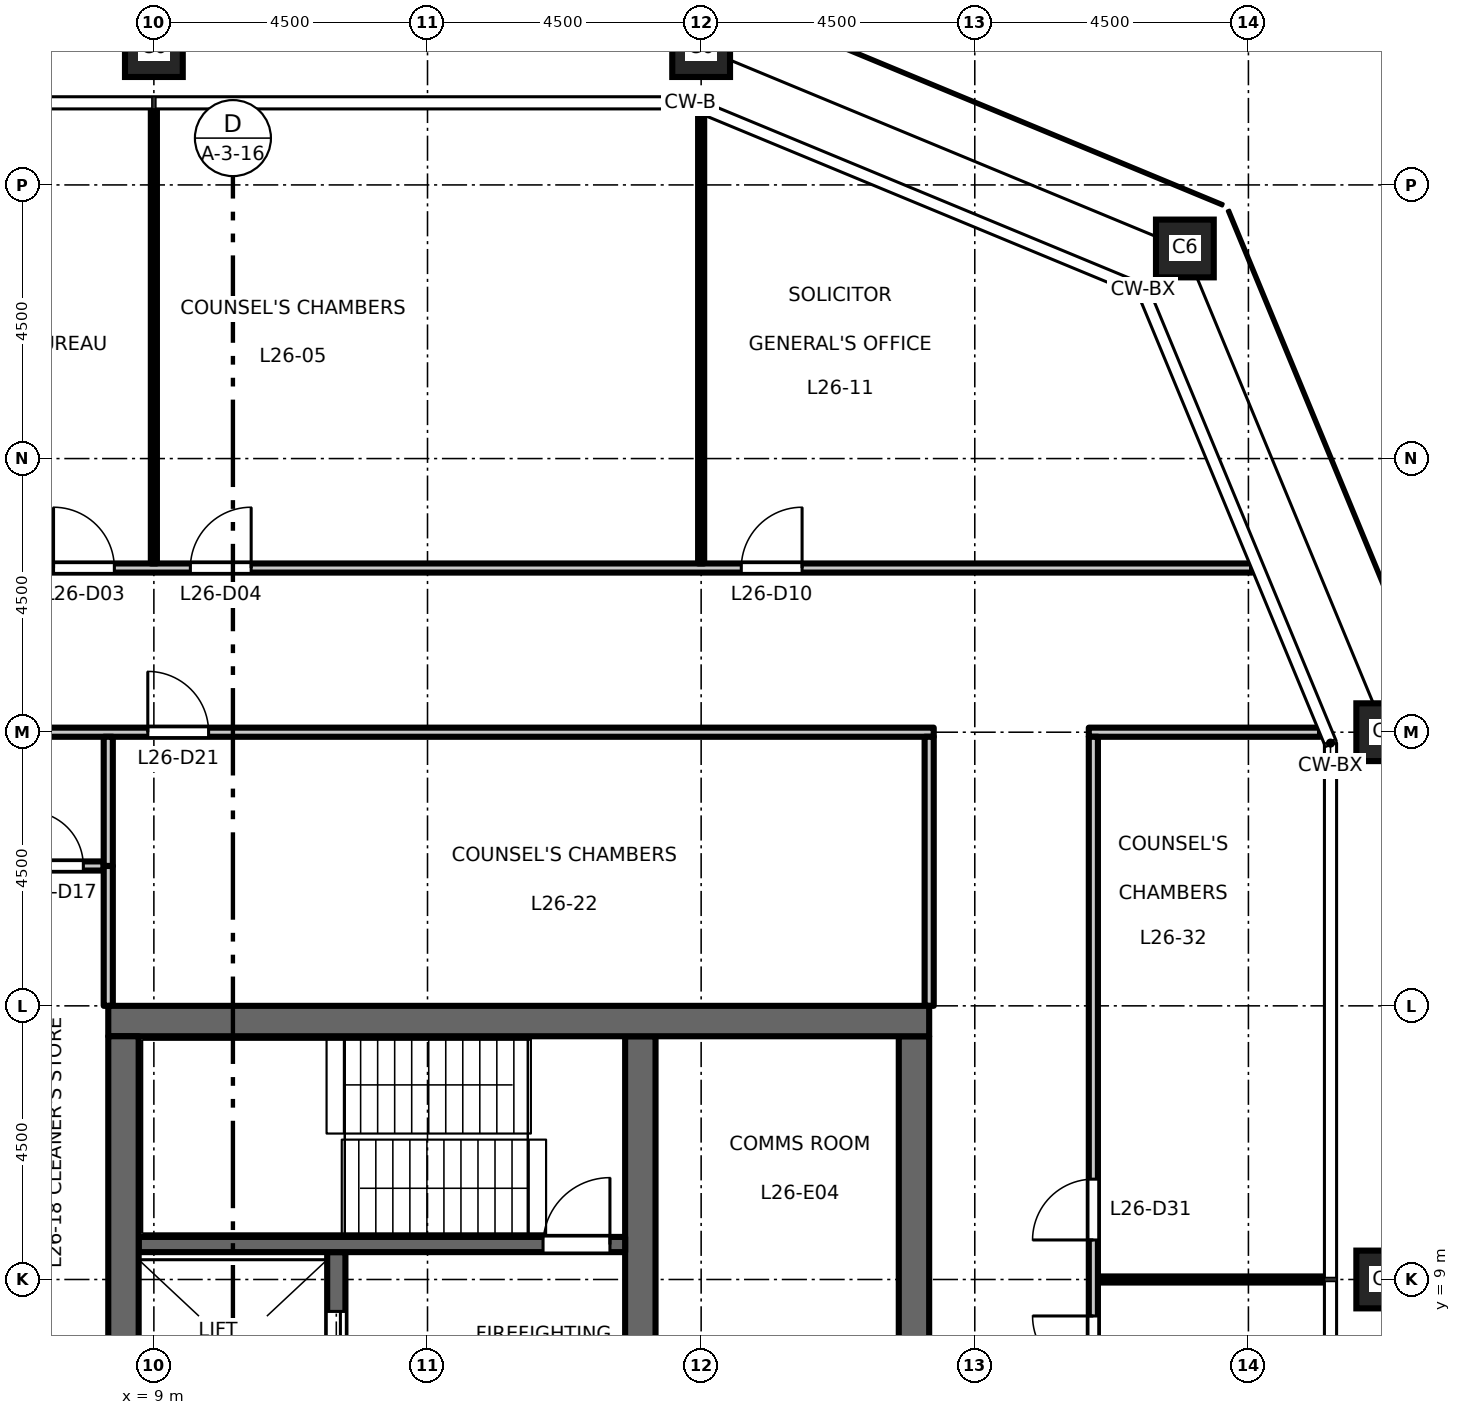
"""IFC4 building model, lengths in metres.
Left out: names, types, materials, properties, quantities, classifications, styles, units other than length and angle.
Written with IfcOpenShell. Run it as: python <this file> out.ifc"""

import sys

from ifc_helpers import new_model, si_unit, direction, frame, frame_2d, origin, origin_2d, place, context, subcontext, project, spatial, rectangle, hollow_rectangle, extrude, element, fill, save


model = new_model("IFC4")
c1 = context("Model", 3, precision=1e-05, world=origin(), true_north=direction((0.0, 1.0)))
c2 = subcontext(c1, "Body", "Model", "MODEL_VIEW")
j1 = project(units=[si_unit("LENGTHUNIT", "METRE"), si_unit("PLANEANGLEUNIT", "RADIAN")], contexts=[c1])
p1 = place(None, origin())
s1 = spatial("IfcSite", under=j1, at=p1, CompositionType="ELEMENT")
p2 = place(p1, origin())
s2 = spatial("IfcBuilding", under=s1, at=p2, CompositionType="ELEMENT")
p3 = place(p2, frame((0.0, 0.0, 122.7)))
s3 = spatial("IfcBuildingStorey", under=s2, at=p3, CompositionType="ELEMENT", Elevation=122.7)
for number, where, z_axis, x_axis in (
    (1, (29.25, 9.0, 0.0), (0.0, 0.0, 1.0), (1.0, 0.0, 0.0)),
    (2, (29.25, 18.0, 0.0), (0.0, 0.0, 1.0), (1.0, 0.0, 0.0)),
    (3, (25.955, 25.955, 0.0), (0.0, 0.0, 1.0), (1.0, 0.0, 0.0)),
    (4, (18.0, 29.25, 0.0), (0.0, 0.0, 1.0), (1.0, 0.0, 0.0)),
    (5, (9.0, 29.25, 0.0), (0.0, 0.0, 1.0), (1.0, 0.0, 0.0)),
):
    element("IfcColumn", number, at=place(p3, frame(where, z_axis=z_axis, x_axis=x_axis)), inside=s3, PredefinedType="COLUMN", context=c2, shape_type="SweptSolid", body=[
        extrude(hollow_rectangle(XDim=0.95, YDim=0.95, WallThickness=0.055, at=origin_2d()), origin(), (0.0, 0.0, 1.0), 4.5),
    ])
p4 = place(p3, frame((12.0, -9.45, 0.0), z_axis=(0.0, 0.0, 1.0), x_axis=(0.0, 1.0, 0.0)))
e6 = element("IfcWall", 6, at=p4, inside=s3, PredefinedType="SHEAR", context=c2, shape_type="SweptSolid", body=[
    extrude(rectangle(XDim=18.9, YDim=0.3, at=frame_2d((9.45, 0.0))), origin(), (0.0, 0.0, 1.0), 4.35),
])
p5 = place(p4, frame((3.625, 0.0, 0.0)))
e7 = element("IfcOpeningElement", 7, at=p5, cuts=e6, PredefinedType="OPENING", context=c2, shape_type="SweptSolid", body=[
    extrude(rectangle(XDim=1.1, YDim=2.1, at=frame_2d((0.55, 1.05))), frame((0.0, 0.16, 0.0), z_axis=(0.0, -1.0, 0.0), x_axis=(1.0, 0.0, 0.0)), (0.0, 0.0, 1.0), 0.32),
])
p6 = place(p4, frame((6.775, 0.0, 0.0)))
e8 = element("IfcOpeningElement", 8, at=p6, cuts=e6, PredefinedType="OPENING", context=c2, shape_type="SweptSolid", body=[
    extrude(rectangle(XDim=1.1, YDim=2.1, at=frame_2d((0.55, 1.05))), frame((0.0, 0.16, 0.0), z_axis=(0.0, -1.0, 0.0), x_axis=(1.0, 0.0, 0.0)), (0.0, 0.0, 1.0), 0.32),
])
p7 = place(p4, frame((9.925, 0.0, 0.0)))
e9 = element("IfcOpeningElement", 9, at=p7, cuts=e6, PredefinedType="OPENING", context=c2, shape_type="SweptSolid", body=[
    extrude(rectangle(XDim=1.1, YDim=2.1, at=frame_2d((0.55, 1.05))), frame((0.0, 0.16, 0.0), z_axis=(0.0, -1.0, 0.0), x_axis=(1.0, 0.0, 0.0)), (0.0, 0.0, 1.0), 0.32),
])
p8 = place(p4, frame((13.075, 0.0, 0.0)))
e10 = element("IfcOpeningElement", 10, at=p8, cuts=e6, PredefinedType="OPENING", context=c2, shape_type="SweptSolid", body=[
    extrude(rectangle(XDim=1.1, YDim=2.1, at=frame_2d((0.55, 1.05))), frame((0.0, 0.16, 0.0), z_axis=(0.0, -1.0, 0.0), x_axis=(1.0, 0.0, 0.0)), (0.0, 0.0, 1.0), 0.32),
])
p9 = place(p4, frame((16.725, 0.0, 0.0)))
e11 = element("IfcOpeningElement", 11, at=p9, cuts=e6, PredefinedType="OPENING", context=c2, shape_type="SweptSolid", body=[
    extrude(rectangle(XDim=1.2, YDim=2.1, at=frame_2d((0.6, 1.05))), frame((0.0, 0.16, 0.0), z_axis=(0.0, -1.0, 0.0), x_axis=(1.0, 0.0, 0.0)), (0.0, 0.0, 1.0), 0.32),
])
p10 = place(p4, frame((0.975, 0.0, 0.0)))
e12 = element("IfcOpeningElement", 12, at=p10, cuts=e6, PredefinedType="OPENING", context=c2, shape_type="SweptSolid", body=[
    extrude(rectangle(XDim=1.2, YDim=2.1, at=frame_2d((0.6, 1.05))), frame((0.0, 0.16, 0.0), z_axis=(0.0, -1.0, 0.0), x_axis=(1.0, 0.0, 0.0)), (0.0, 0.0, 1.0), 0.32),
])
p11 = place(p3, frame((21.5, -13.0, 0.0), z_axis=(0.0, 0.0, 1.0), x_axis=(0.0, 1.0, 0.0)))
e13 = element("IfcWall", 13, at=p11, inside=s3, PredefinedType="SHEAR", context=c2, shape_type="SweptSolid", body=[
    extrude(rectangle(XDim=26.0, YDim=0.5, at=frame_2d((13.0, 0.0))), origin(), (0.0, 0.0, 1.0), 4.35),
])
p12 = place(p11, frame((16.825, 0.0, 0.0)))
e14 = element("IfcOpeningElement", 14, at=p12, cuts=e13, PredefinedType="OPENING", context=c2, shape_type="SweptSolid", body=[
    extrude(rectangle(XDim=1.8, YDim=2.1, at=frame_2d((0.9, 1.05))), frame((0.0, 0.26, 0.0), z_axis=(0.0, -1.0, 0.0), x_axis=(1.0, 0.0, 0.0)), (0.0, 0.0, 1.0), 0.52),
])
p13 = place(p11, frame((7.375, 0.0, 0.0)))
e15 = element("IfcOpeningElement", 15, at=p13, cuts=e13, PredefinedType="OPENING", context=c2, shape_type="SweptSolid", body=[
    extrude(rectangle(XDim=1.8, YDim=2.1, at=frame_2d((0.9, 1.05))), frame((0.0, 0.26, 0.0), z_axis=(0.0, -1.0, 0.0), x_axis=(1.0, 0.0, 0.0)), (0.0, 0.0, 1.0), 0.52),
])
p14 = place(p11, frame((1.3, 0.0, 0.0)))
e16 = element("IfcOpeningElement", 16, at=p14, cuts=e13, PredefinedType="OPENING", context=c2, shape_type="SweptSolid", body=[
    extrude(rectangle(XDim=0.9, YDim=2.1, at=frame_2d((0.45, 1.05))), frame((0.0, 0.26, 0.0), z_axis=(0.0, -1.0, 0.0), x_axis=(1.0, 0.0, 0.0)), (0.0, 0.0, 1.0), 0.52),
])
p15 = place(p3, frame((17.0, 6.425, 0.0), z_axis=(0.0, 0.0, 1.0), x_axis=(0.0, 1.0, 0.0)))
e17 = element("IfcWall", 17, at=p15, inside=s3, PredefinedType="SHEAR", context=c2, shape_type="SweptSolid", body=[
    extrude(rectangle(XDim=6.575, YDim=0.5, at=frame_2d((3.288, 0.0))), origin(), (0.0, 0.0, 1.0), 4.35),
])
p16 = place(p3, frame((8.75, 9.575, 0.0), z_axis=(0.0, 0.0, 1.0), x_axis=(1.0, 0.0, 0.0)))
e18 = element("IfcWall", 18, at=p16, inside=s3, PredefinedType="SHEAR", context=c2, shape_type="SweptSolid", body=[
    extrude(rectangle(XDim=8.0, YDim=0.25, at=frame_2d((4.0, 0.0))), origin(), (0.0, 0.0, 1.0), 4.35),
])
p17 = place(p16, frame((6.65, 0.0, 0.0)))
e19 = element("IfcOpeningElement", 19, at=p17, cuts=e18, PredefinedType="OPENING", context=c2, shape_type="SweptSolid", body=[
    extrude(rectangle(XDim=1.1, YDim=2.1, at=frame_2d((0.55, 1.05))), frame((0.0, 0.135, 0.0), z_axis=(0.0, -1.0, 0.0), x_axis=(1.0, 0.0, 0.0)), (0.0, 0.0, 1.0), 0.27),
])
p18 = place(p3, frame((8.25, 13.25, 0.0), z_axis=(0.0, 0.0, 1.0), x_axis=(1.0, 0.0, 0.0)))
e20 = element("IfcWall", 20, at=p18, inside=s3, PredefinedType="SHEAR", context=c2, shape_type="SweptSolid", body=[
    extrude(rectangle(XDim=13.5, YDim=0.5, at=frame_2d((6.75, 0.0))), origin(), (0.0, 0.0, 1.0), 4.35),
])
p19 = place(p3, frame((8.5, -13.0, 0.0), z_axis=(0.0, 0.0, 1.0), x_axis=(0.0, 1.0, 0.0)))
e21 = element("IfcWall", 21, at=p19, inside=s3, PredefinedType="SHEAR", context=c2, shape_type="SweptSolid", body=[
    extrude(rectangle(XDim=26.0, YDim=0.5, at=frame_2d((13.0, 0.0))), origin(), (0.0, 0.0, 1.0), 4.35),
])
p20 = place(p3, frame((24.525, 9.0, 0.0), z_axis=(0.0, 0.0, 1.0), x_axis=(1.0, 0.0, 0.0)))
e22 = element("IfcWall", 22, at=p20, inside=s3, PredefinedType="PARTITIONING", context=c2, shape_type="SweptSolid", body=[
    extrude(rectangle(XDim=3.735, YDim=0.1, at=frame_2d((1.868, 0.0))), origin(), (0.0, 0.0, 1.0), 4.35),
])
p21 = place(p3, frame((6.54, 15.8, 0.0), z_axis=(0.0, 0.0, 1.0), x_axis=(1.0, 0.0, 0.0)))
e23 = element("IfcWall", 23, at=p21, inside=s3, PredefinedType="PARTITIONING", context=c2, shape_type="SweptSolid", body=[
    extrude(rectangle(XDim=1.635, YDim=0.15, at=frame_2d((0.817, 0.0))), origin(), (0.0, 0.0, 1.0), 4.35),
])
p22 = place(p21, frame((0.4, 0.0, 0.0)))
e24 = element("IfcOpeningElement", 24, at=p22, cuts=e23, PredefinedType="OPENING", context=c2, shape_type="SweptSolid", body=[
    extrude(rectangle(XDim=0.9, YDim=2.1, at=frame_2d((0.45, 1.05))), frame((0.0, 0.085, 0.0), z_axis=(0.0, -1.0, 0.0), x_axis=(1.0, 0.0, 0.0)), (0.0, 0.0, 1.0), 0.17),
])
p23 = place(p3, frame((-21.825, 18.0, 0.0), z_axis=(0.0, 0.0, 1.0), x_axis=(1.0, 0.0, 0.0)))
e25 = element("IfcWall", 25, at=p23, inside=s3, PredefinedType="PARTITIONING", context=c2, shape_type="SweptSolid", body=[
    extrude(rectangle(XDim=43.65, YDim=0.15, at=frame_2d((21.825, 0.0))), origin(), (0.0, 0.0, 1.0), 4.35),
])
p24 = place(p23, frame((14.225, 0.0, 0.0)))
e26 = element("IfcOpeningElement", 26, at=p24, cuts=e25, PredefinedType="OPENING", context=c2, shape_type="SweptSolid", body=[
    extrude(rectangle(XDim=1.0, YDim=2.1, at=frame_2d((0.5, 1.05))), frame((0.0, 0.085, 0.0), z_axis=(0.0, -1.0, 0.0), x_axis=(1.0, 0.0, 0.0)), (0.0, 0.0, 1.0), 0.17),
])
p25 = place(p23, frame((11.975, 0.0, 0.0)))
e27 = element("IfcOpeningElement", 27, at=p25, cuts=e25, PredefinedType="OPENING", context=c2, shape_type="SweptSolid", body=[
    extrude(rectangle(XDim=1.0, YDim=2.1, at=frame_2d((0.5, 1.05))), frame((0.0, 0.085, 0.0), z_axis=(0.0, -1.0, 0.0), x_axis=(1.0, 0.0, 0.0)), (0.0, 0.0, 1.0), 0.17),
])
p26 = place(p23, frame((30.725, 0.0, 0.0)))
e28 = element("IfcOpeningElement", 28, at=p26, cuts=e25, PredefinedType="OPENING", context=c2, shape_type="SweptSolid", body=[
    extrude(rectangle(XDim=1.0, YDim=2.1, at=frame_2d((0.5, 1.05))), frame((0.0, 0.085, 0.0), z_axis=(0.0, -1.0, 0.0), x_axis=(1.0, 0.0, 0.0)), (0.0, 0.0, 1.0), 0.17),
])
p27 = place(p3, frame((24.375, 18.0, 0.0), z_axis=(0.0, 0.0, 1.0), x_axis=(1.0, 0.0, 0.0)))
e29 = element("IfcWall", 29, at=p27, inside=s3, PredefinedType="PARTITIONING", context=c2, shape_type="SweptSolid", body=[
    extrude(rectangle(XDim=3.803, YDim=0.15, at=frame_2d((1.901, 0.0))), origin(), (0.0, 0.0, 1.0), 4.35),
])
p28 = place(p3, frame((-27.06, 20.7, 0.0), z_axis=(0.0, 0.0, 1.0), x_axis=(1.0, 0.0, 0.0)))
e30 = element("IfcWall", 30, at=p28, inside=s3, PredefinedType="PARTITIONING", context=c2, shape_type="SweptSolid", body=[
    extrude(rectangle(XDim=54.12, YDim=0.15, at=frame_2d((27.06, 0.0))), origin(), (0.0, 0.0, 1.0), 4.35),
])
p29 = place(p28, frame((16.41, 0.0, 0.0)))
e31 = element("IfcOpeningElement", 31, at=p29, cuts=e30, PredefinedType="OPENING", context=c2, shape_type="SweptSolid", body=[
    extrude(rectangle(XDim=1.0, YDim=2.1, at=frame_2d((0.5, 1.05))), frame((0.0, 0.085, 0.0), z_axis=(0.0, -1.0, 0.0), x_axis=(1.0, 0.0, 0.0)), (0.0, 0.0, 1.0), 0.17),
])
p30 = place(p28, frame((18.66, 0.0, 0.0)))
e32 = element("IfcOpeningElement", 32, at=p30, cuts=e30, PredefinedType="OPENING", context=c2, shape_type="SweptSolid", body=[
    extrude(rectangle(XDim=1.0, YDim=2.1, at=frame_2d((0.5, 1.05))), frame((0.0, 0.085, 0.0), z_axis=(0.0, -1.0, 0.0), x_axis=(1.0, 0.0, 0.0)), (0.0, 0.0, 1.0), 0.17),
])
p31 = place(p28, frame((34.41, 0.0, 0.0)))
e33 = element("IfcOpeningElement", 33, at=p31, cuts=e30, PredefinedType="OPENING", context=c2, shape_type="SweptSolid", body=[
    extrude(rectangle(XDim=1.0, YDim=2.1, at=frame_2d((0.5, 1.05))), frame((0.0, 0.085, 0.0), z_axis=(0.0, -1.0, 0.0), x_axis=(1.0, 0.0, 0.0)), (0.0, 0.0, 1.0), 0.17),
])
p32 = place(p28, frame((36.66, 0.0, 0.0)))
e34 = element("IfcOpeningElement", 34, at=p32, cuts=e30, PredefinedType="OPENING", context=c2, shape_type="SweptSolid", body=[
    extrude(rectangle(XDim=1.0, YDim=2.1, at=frame_2d((0.5, 1.05))), frame((0.0, 0.085, 0.0), z_axis=(0.0, -1.0, 0.0), x_axis=(1.0, 0.0, 0.0)), (0.0, 0.0, 1.0), 0.17),
])
p33 = place(p28, frame((7.41, 0.0, 0.0)))
e35 = element("IfcOpeningElement", 35, at=p33, cuts=e30, PredefinedType="OPENING", context=c2, shape_type="SweptSolid", body=[
    extrude(rectangle(XDim=1.0, YDim=2.1, at=frame_2d((0.5, 1.05))), frame((0.0, 0.085, 0.0), z_axis=(0.0, -1.0, 0.0), x_axis=(1.0, 0.0, 0.0)), (0.0, 0.0, 1.0), 0.17),
])
p34 = place(p28, frame((45.72, 0.0, 0.0)))
e36 = element("IfcOpeningElement", 36, at=p34, cuts=e30, PredefinedType="OPENING", context=c2, shape_type="SweptSolid", body=[
    extrude(rectangle(XDim=1.0, YDim=2.1, at=frame_2d((0.5, 1.05))), frame((0.0, 0.085, 0.0), z_axis=(0.0, -1.0, 0.0), x_axis=(1.0, 0.0, 0.0)), (0.0, 0.0, 1.0), 0.17),
])
p35 = place(p3, frame((8.25, 15.8, 0.0), z_axis=(0.0, 0.0, 1.0), x_axis=(0.0, 1.0, 0.0)))
e37 = element("IfcWall", 37, at=p35, inside=s3, PredefinedType="PARTITIONING", context=c2, shape_type="SweptSolid", body=[
    extrude(rectangle(XDim=2.125, YDim=0.15, at=frame_2d((1.062, 0.0))), origin(), (0.0, 0.0, 1.0), 4.35),
])
p36 = place(p3, frame((8.25, 13.5, 0.0), z_axis=(0.0, 0.0, 1.0), x_axis=(0.0, 1.0, 0.0)))
e38 = element("IfcWall", 38, at=p36, inside=s3, PredefinedType="PARTITIONING", context=c2, shape_type="SweptSolid", body=[
    extrude(rectangle(XDim=2.3, YDim=0.15, at=frame_2d((1.15, 0.0))), origin(), (0.0, 0.0, 1.0), 4.35),
])
p37 = place(p3, frame((9.0, 20.775, 0.0), z_axis=(0.0, 0.0, 1.0), x_axis=(0.0, 1.0, 0.0)))
e39 = element("IfcWall", 39, at=p37, inside=s3, PredefinedType="PARTITIONING", context=c2, shape_type="SweptSolid", body=[
    extrude(rectangle(XDim=7.485, YDim=0.1, at=frame_2d((3.743, 0.0))), origin(), (0.0, 0.0, 1.0), 3.45),
])
p38 = place(p3, frame((18.0, 20.775, 0.0), z_axis=(0.0, 0.0, 1.0), x_axis=(0.0, 1.0, 0.0)))
e40 = element("IfcWall", 40, at=p38, inside=s3, PredefinedType="PARTITIONING", context=c2, shape_type="SweptSolid", body=[
    extrude(rectangle(XDim=7.403, YDim=0.1, at=frame_2d((3.702, 0.0))), origin(), (0.0, 0.0, 1.0), 3.45),
])
p39 = place(p3, frame((21.75, 13.5, 0.0), z_axis=(0.0, 0.0, 1.0), x_axis=(0.0, 1.0, 0.0)))
e41 = element("IfcWall", 41, at=p39, inside=s3, PredefinedType="PARTITIONING", context=c2, shape_type="SweptSolid", body=[
    extrude(rectangle(XDim=4.425, YDim=0.15, at=frame_2d((2.212, 0.0))), origin(), (0.0, 0.0, 1.0), 4.35),
])
p40 = place(p3, frame((24.45, -17.925, 0.0), z_axis=(0.0, 0.0, 1.0), x_axis=(0.0, 1.0, 0.0)))
e42 = element("IfcWall", 42, at=p40, inside=s3, PredefinedType="PARTITIONING", context=c2, shape_type="SweptSolid", body=[
    extrude(rectangle(XDim=35.85, YDim=0.15, at=frame_2d((17.925, 0.0))), origin(), (0.0, 0.0, 1.0), 4.35),
])
p41 = place(p40, frame((7.325, 0.0, 0.0)))
e43 = element("IfcOpeningElement", 43, at=p41, cuts=e42, PredefinedType="OPENING", context=c2, shape_type="SweptSolid", body=[
    extrude(rectangle(XDim=1.0, YDim=2.1, at=frame_2d((0.5, 1.05))), frame((0.0, 0.085, 0.0), z_axis=(0.0, -1.0, 0.0), x_axis=(1.0, 0.0, 0.0)), (0.0, 0.0, 1.0), 0.17),
])
p42 = place(p40, frame((9.575, 0.0, 0.0)))
e44 = element("IfcOpeningElement", 44, at=p42, cuts=e42, PredefinedType="OPENING", context=c2, shape_type="SweptSolid", body=[
    extrude(rectangle(XDim=1.0, YDim=2.1, at=frame_2d((0.5, 1.05))), frame((0.0, 0.085, 0.0), z_axis=(0.0, -1.0, 0.0), x_axis=(1.0, 0.0, 0.0)), (0.0, 0.0, 1.0), 0.17),
])
p43 = place(p40, frame((25.325, 0.0, 0.0)))
e45 = element("IfcOpeningElement", 45, at=p43, cuts=e42, PredefinedType="OPENING", context=c2, shape_type="SweptSolid", body=[
    extrude(rectangle(XDim=1.0, YDim=2.1, at=frame_2d((0.5, 1.05))), frame((0.0, 0.085, 0.0), z_axis=(0.0, -1.0, 0.0), x_axis=(1.0, 0.0, 0.0)), (0.0, 0.0, 1.0), 0.17),
])
p44 = place(p40, frame((27.575, 0.0, 0.0)))
e46 = element("IfcOpeningElement", 46, at=p44, cuts=e42, PredefinedType="OPENING", context=c2, shape_type="SweptSolid", body=[
    extrude(rectangle(XDim=1.0, YDim=2.1, at=frame_2d((0.5, 1.05))), frame((0.0, 0.085, 0.0), z_axis=(0.0, -1.0, 0.0), x_axis=(1.0, 0.0, 0.0)), (0.0, 0.0, 1.0), 0.17),
])
p45 = place(p17, origin())
e47 = element("IfcDoor", 47, at=p45, inside=s3, OperationType="SINGLE_SWING_LEFT", PredefinedType="DOOR", context=c2, shape_type="SweptSolid", body=[
    extrude(rectangle(XDim=1.1, YDim=2.1, at=frame_2d((0.55, 1.05))), frame((0.0, 0.025, 0.0), z_axis=(0.0, -1.0, 0.0), x_axis=(1.0, 0.0, 0.0)), (0.0, 0.0, 1.0), 0.05),
])
fill(e19, e47)
p46 = place(p9, origin())
e48 = element("IfcDoor", 48, at=p46, inside=s3, OperationType="DOUBLE_DOOR_SLIDING", PredefinedType="DOOR", context=c2, shape_type="SweptSolid", body=[
    extrude(rectangle(XDim=1.2, YDim=2.1, at=frame_2d((0.6, 1.05))), frame((0.0, 0.025, 0.0), z_axis=(0.0, -1.0, 0.0), x_axis=(1.0, 0.0, 0.0)), (0.0, 0.0, 1.0), 0.05),
])
fill(e11, e48)
p47 = place(p31, origin())
e49 = element("IfcDoor", 49, at=p47, inside=s3, OperationType="SINGLE_SWING_LEFT", PredefinedType="DOOR", context=c2, shape_type="SweptSolid", body=[
    extrude(rectangle(XDim=1.0, YDim=2.1, at=frame_2d((0.5, 1.05))), frame((0.0, 0.025, 0.0), z_axis=(0.0, -1.0, 0.0), x_axis=(1.0, 0.0, 0.0)), (0.0, 0.0, 1.0), 0.05),
])
fill(e33, e49)
p48 = place(p32, origin())
e50 = element("IfcDoor", 50, at=p48, inside=s3, OperationType="SINGLE_SWING_RIGHT", PredefinedType="DOOR", context=c2, shape_type="SweptSolid", body=[
    extrude(rectangle(XDim=1.0, YDim=2.1, at=frame_2d((0.5, 1.05))), frame((0.0, 0.025, 0.0), z_axis=(0.0, -1.0, 0.0), x_axis=(1.0, 0.0, 0.0)), (0.0, 0.0, 1.0), 0.05),
])
fill(e34, e50)
p49 = place(p34, origin())
e51 = element("IfcDoor", 51, at=p49, inside=s3, OperationType="SINGLE_SWING_RIGHT", PredefinedType="DOOR", context=c2, shape_type="SweptSolid", body=[
    extrude(rectangle(XDim=1.0, YDim=2.1, at=frame_2d((0.5, 1.05))), frame((0.0, 0.025, 0.0), z_axis=(0.0, -1.0, 0.0), x_axis=(1.0, 0.0, 0.0)), (0.0, 0.0, 1.0), 0.05),
])
fill(e36, e51)
p50 = place(p22, origin())
e52 = element("IfcDoor", 52, at=p50, inside=s3, OperationType="SINGLE_SWING_LEFT", PredefinedType="DOOR", context=c2, shape_type="SweptSolid", body=[
    extrude(rectangle(XDim=0.9, YDim=2.1, at=frame_2d((0.45, 1.05))), frame((0.0, 0.025, 0.0), z_axis=(0.0, -1.0, 0.0), x_axis=(1.0, 0.0, 0.0)), (0.0, 0.0, 1.0), 0.05),
])
fill(e24, e52)
p51 = place(p26, origin())
e53 = element("IfcDoor", 53, at=p51, inside=s3, OperationType="SINGLE_SWING_LEFT", PredefinedType="DOOR", context=c2, shape_type="SweptSolid", body=[
    extrude(rectangle(XDim=1.0, YDim=2.1, at=frame_2d((0.5, 1.05))), frame((0.0, 0.025, 0.0), z_axis=(0.0, -1.0, 0.0), x_axis=(1.0, 0.0, 0.0)), (0.0, 0.0, 1.0), 0.05),
])
fill(e28, e53)
p52 = place(p43, origin())
e54 = element("IfcDoor", 54, at=p52, inside=s3, OperationType="SINGLE_SWING_RIGHT", PredefinedType="DOOR", context=c2, shape_type="SweptSolid", body=[
    extrude(rectangle(XDim=1.0, YDim=2.1, at=frame_2d((0.5, 1.05))), frame((0.0, 0.025, 0.0), z_axis=(0.0, -1.0, 0.0), x_axis=(1.0, 0.0, 0.0)), (0.0, 0.0, 1.0), 0.05),
])
fill(e45, e54)
p53 = place(p44, origin())
e55 = element("IfcDoor", 55, at=p53, inside=s3, OperationType="SINGLE_SWING_LEFT", PredefinedType="DOOR", context=c2, shape_type="SweptSolid", body=[
    extrude(rectangle(XDim=1.0, YDim=2.1, at=frame_2d((0.5, 1.05))), frame((0.0, 0.025, 0.0), z_axis=(0.0, -1.0, 0.0), x_axis=(1.0, 0.0, 0.0)), (0.0, 0.0, 1.0), 0.05),
])
fill(e46, e55)
save(model, sys.argv[1])
